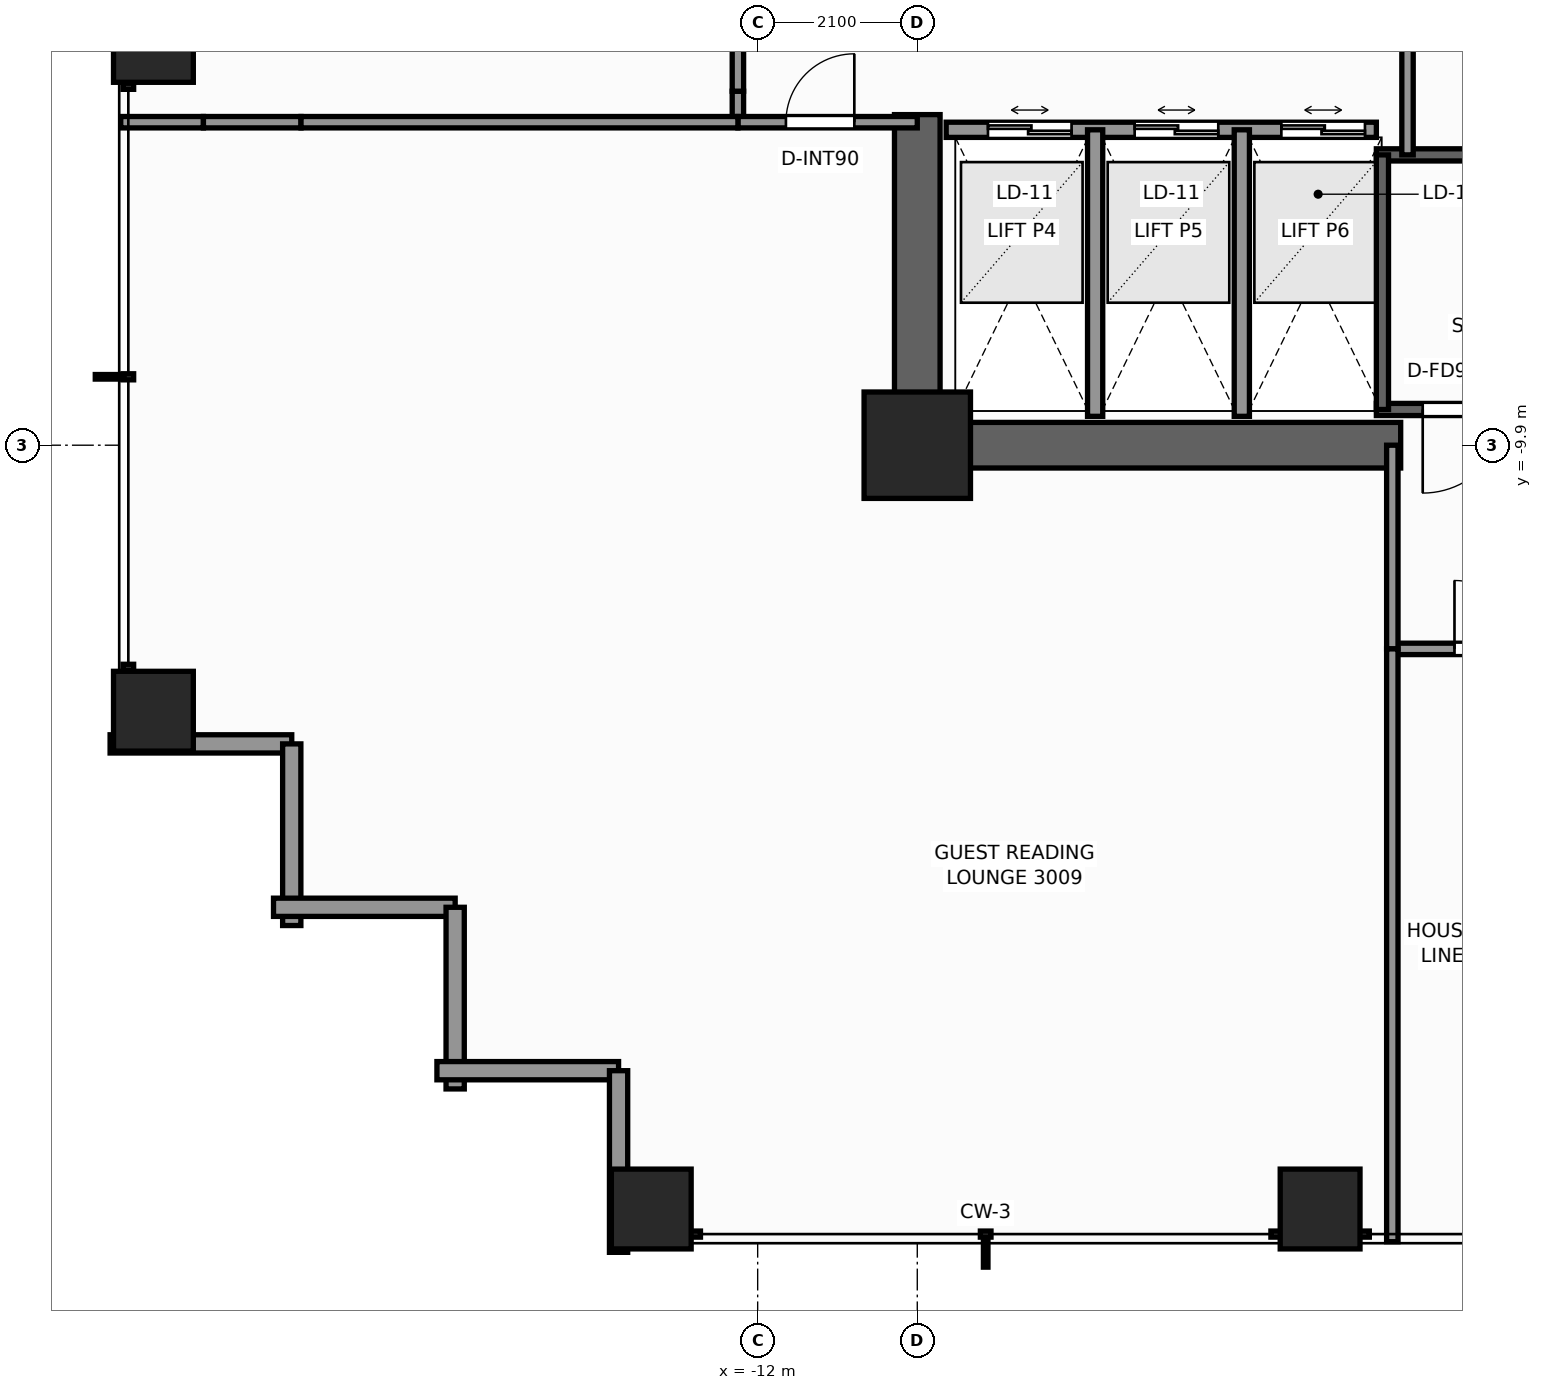
"""IFC4 building model, lengths in metres.
Left out: names, types, materials, properties, quantities, classifications, styles, units other than length and angle.
Written with IfcOpenShell. Run it as: python <this file> out.ifc"""

import sys

from ifc_helpers import new_model, si_unit, direction, frame, frame_2d, origin, origin_2d, place, context, subcontext, project, spatial, rectangle, extrude, element, fill, save


model = new_model("IFC4")
c1 = context("Model", 3, precision=1e-05, world=origin(), true_north=direction((0.0, 1.0)))
c2 = subcontext(c1, "Body", "Model", "MODEL_VIEW")
j1 = project(units=[si_unit("LENGTHUNIT", "METRE"), si_unit("PLANEANGLEUNIT", "RADIAN")], contexts=[c1])
p1 = place(None, origin())
s1 = spatial("IfcSite", under=j1, at=p1, CompositionType="ELEMENT")
p2 = place(p1, origin())
s2 = spatial("IfcBuilding", under=s1, at=p2, CompositionType="ELEMENT")
p3 = place(p2, frame((0.0, 0.0, 105.2)))
s3 = spatial("IfcBuildingStorey", under=s2, at=p3, CompositionType="ELEMENT", Elevation=105.2)
p4 = place(p3, frame((-3.54, -9.9, 0.0), z_axis=(0.0, 0.0, 1.0), x_axis=(-1.0, 0.0, 0.0)))
e1 = element("IfcWall", 1, at=p4, inside=s3, PredefinedType="SHEAR", context=c2, shape_type="SweptSolid", body=[
    extrude(rectangle(XDim=6.66, YDim=0.6, at=frame_2d((3.33, 0.0))), origin(), (0.0, 0.0, 1.0), 3.3),
])
p5 = place(p3, frame((-9.9, -9.6, 0.0), z_axis=(0.0, 0.0, 1.0), x_axis=(0.0, 1.0, 0.0)))
e2 = element("IfcWall", 2, at=p5, inside=s3, PredefinedType="SHEAR", context=c2, shape_type="SweptSolid", body=[
    extrude(rectangle(XDim=4.05, YDim=0.6, at=frame_2d((2.025, 0.0))), origin(), (0.0, 0.0, 1.0), 3.3),
])
p6 = place(p3, frame((-9.9, -9.9, 0.0), z_axis=(0.0, 0.0, 1.0), x_axis=(1.0, 0.0, 0.0)))
e3 = element("IfcColumn", 3, at=p6, inside=s3, PredefinedType="COLUMN", context=c2, shape_type="SweptSolid", body=[
    extrude(rectangle(XDim=1.4, YDim=1.4, at=origin_2d()), origin(), (0.0, 0.0, 1.0), 3.3),
])
for number, where, z_axis, x_axis in (
    (4, (-13.4, -19.95, 0.0), (0.0, 0.0, 1.0), (1.0, 0.0, 0.0)),
    (5, (-4.6, -19.95, 0.0), (0.0, 0.0, 1.0), (1.0, 0.0, 0.0)),
    (6, (-19.95, -13.4, 0.0), (0.0, 0.0, 1.0), (1.0, 0.0, 0.0)),
    (7, (-19.95, -4.6, 0.0), (0.0, 0.0, 1.0), (1.0, 0.0, 0.0)),
):
    element("IfcColumn", number, at=place(p3, frame(where, z_axis=z_axis, x_axis=x_axis)), inside=s3, PredefinedType="COLUMN", context=c2, shape_type="SweptSolid", body=[
        extrude(rectangle(XDim=1.05, YDim=1.05, at=origin_2d()), origin(), (0.0, 0.0, 1.0), 3.3),
    ])
p7 = place(p3, frame((-18.13, -13.83, 0.0), z_axis=(0.0, 0.0, 1.0), x_axis=(-1.0, 0.0, 0.0)))
e8 = element("IfcWall", 8, at=p7, inside=s3, PredefinedType="STANDARD", context=c2, shape_type="SweptSolid", body=[
    extrude(rectangle(XDim=2.39, YDim=0.24, at=frame_2d((1.195, 0.0))), origin(), (0.0, 0.0, 1.0), 1.275),
])
p8 = place(p3, frame((-18.13, -16.22, 0.0), z_axis=(0.0, 0.0, 1.0), x_axis=(0.0, 1.0, 0.0)))
e9 = element("IfcWall", 9, at=p8, inside=s3, PredefinedType="STANDARD", context=c2, shape_type="SweptSolid", body=[
    extrude(rectangle(XDim=2.39, YDim=0.24, at=frame_2d((1.195, 0.0))), origin(), (0.0, 0.0, 1.0), 1.275),
])
for number, where, z_axis, x_axis in (
    (10, (-15.98, -15.98, 0.0), (0.0, 0.0, 1.0), (-1.0, 0.0, 0.0)),
    (11, (-15.98, -18.37, 0.0), (0.0, 0.0, 1.0), (0.0, 1.0, 0.0)),
):
    element("IfcWall", number, at=place(p3, frame(where, z_axis=z_axis, x_axis=x_axis)), inside=s3, PredefinedType="STANDARD", context=c2, shape_type="SweptSolid", body=[
        extrude(rectangle(XDim=2.39, YDim=0.24, at=frame_2d((1.195, 0.0))), origin(), (0.0, 0.0, 1.0), 1.275),
    ])
p9 = place(p3, frame((-13.83, -18.13, 0.0), z_axis=(0.0, 0.0, 1.0), x_axis=(-1.0, 0.0, 0.0)))
e12 = element("IfcWall", 12, at=p9, inside=s3, PredefinedType="STANDARD", context=c2, shape_type="SweptSolid", body=[
    extrude(rectangle(XDim=2.39, YDim=0.24, at=frame_2d((1.195, 0.0))), origin(), (0.0, 0.0, 1.0), 1.275),
])
p10 = place(p3, frame((-13.83, -20.52, 0.0), z_axis=(0.0, 0.0, 1.0), x_axis=(0.0, 1.0, 0.0)))
e13 = element("IfcWall", 13, at=p10, inside=s3, PredefinedType="STANDARD", context=c2, shape_type="SweptSolid", body=[
    extrude(rectangle(XDim=2.39, YDim=0.24, at=frame_2d((1.195, 0.0))), origin(), (0.0, 0.0, 1.0), 1.275),
])
p11 = place(p3, frame((3.86, -9.43, 0.0), z_axis=(0.0, 0.0, 1.0), x_axis=(-1.0, 0.0, 0.0)))
e14 = element("IfcWall", 14, at=p11, inside=s3, PredefinedType="SHEAR", context=c2, shape_type="SweptSolid", body=[
    extrude(rectangle(XDim=7.72, YDim=0.16, at=frame_2d((3.86, 0.0))), origin(), (0.0, 0.0, 1.0), 3.3),
])
p12 = place(p11, frame((6.01, 0.0, 0.0)))
e15 = element("IfcOpeningElement", 15, at=p12, cuts=e14, PredefinedType="OPENING", context=c2, shape_type="SweptSolid", body=[
    extrude(rectangle(XDim=1.1, YDim=2.2, at=frame_2d((0.55, 1.1))), frame((0.0, 0.09, 0.0), z_axis=(0.0, -1.0, 0.0), x_axis=(1.0, 0.0, 0.0)), (0.0, 0.0, 1.0), 0.18),
])
p13 = place(p3, frame((-3.86, -6.08, 0.0), z_axis=(0.0, 0.0, 1.0), x_axis=(1.0, 0.0, 0.0)))
e16 = element("IfcWall", 16, at=p13, inside=s3, PredefinedType="SHEAR", context=c2, shape_type="SweptSolid", body=[
    extrude(rectangle(XDim=7.72, YDim=0.16, at=frame_2d((3.86, 0.0))), origin(), (0.0, 0.0, 1.0), 3.3),
])
p14 = place(p3, frame((-3.78, -9.43, 0.0), z_axis=(0.0, 0.0, 1.0), x_axis=(0.0, 1.0, 0.0)))
e17 = element("IfcWall", 17, at=p14, inside=s3, PredefinedType="SHEAR", context=c2, shape_type="SweptSolid", body=[
    extrude(rectangle(XDim=3.35, YDim=0.16, at=frame_2d((1.675, 0.0))), origin(), (0.0, 0.0, 1.0), 3.3),
])
p15 = place(p3, frame((-9.52, -5.75, 0.0), z_axis=(0.0, 0.0, 1.0), x_axis=(1.0, 0.0, 0.0)))
e18 = element("IfcWall", 18, at=p15, inside=s3, PredefinedType="SOLIDWALL", context=c2, shape_type="SweptSolid", body=[
    extrude(rectangle(XDim=5.66, YDim=0.2, at=frame_2d((2.83, 0.0))), origin(), (0.0, 0.0, 1.0), 3.08),
])
p16 = place(p15, frame((0.55, 0.0, 0.0)))
e19 = element("IfcOpeningElement", 19, at=p16, cuts=e18, PredefinedType="OPENING", context=c2, shape_type="SweptSolid", body=[
    extrude(rectangle(XDim=1.1, YDim=2.2, at=frame_2d((0.55, 1.1))), frame((0.0, 0.11, 0.0), z_axis=(0.0, -1.0, 0.0), x_axis=(1.0, 0.0, 0.0)), (0.0, 0.0, 1.0), 0.22),
])
p17 = place(p15, frame((2.48, 0.0, 0.0)))
e20 = element("IfcOpeningElement", 20, at=p17, cuts=e18, PredefinedType="OPENING", context=c2, shape_type="SweptSolid", body=[
    extrude(rectangle(XDim=1.1, YDim=2.2, at=frame_2d((0.55, 1.1))), frame((0.0, 0.11, 0.0), z_axis=(0.0, -1.0, 0.0), x_axis=(1.0, 0.0, 0.0)), (0.0, 0.0, 1.0), 0.22),
])
p18 = place(p15, frame((4.41, 0.0, 0.0)))
e21 = element("IfcOpeningElement", 21, at=p18, cuts=e18, PredefinedType="OPENING", context=c2, shape_type="SweptSolid", body=[
    extrude(rectangle(XDim=1.1, YDim=2.2, at=frame_2d((0.55, 1.1))), frame((0.0, 0.11, 0.0), z_axis=(0.0, -1.0, 0.0), x_axis=(1.0, 0.0, 0.0)), (0.0, 0.0, 1.0), 0.22),
])
for number, where, z_axis, x_axis in (
    (22, (-7.56, -9.52, 0.0), (0.0, 0.0, 1.0), (0.0, 1.0, 0.0)),
    (23, (-5.63, -9.52, 0.0), (0.0, 0.0, 1.0), (0.0, 1.0, 0.0)),
):
    element("IfcWall", number, at=place(p3, frame(where, z_axis=z_axis, x_axis=x_axis)), inside=s3, PredefinedType="SOLIDWALL", context=c2, shape_type="SweptSolid", body=[
        extrude(rectangle(XDim=3.77, YDim=0.2, at=frame_2d((1.885, 0.0))), origin(), (0.0, 0.0, 1.0), 3.08),
    ])
p19 = place(p3, frame((-3.45, -6.08, 0.0), z_axis=(0.0, 0.0, 1.0), x_axis=(0.0, 1.0, 0.0)))
e24 = element("IfcWall", 24, at=p19, inside=s3, PredefinedType="PARTITIONING", context=c2, shape_type="SweptSolid", body=[
    extrude(rectangle(XDim=2.36, YDim=0.15, at=frame_2d((1.18, 0.0))), origin(), (0.0, 0.0, 1.0), 3.08),
])
p20 = place(p3, frame((-3.65, -12.58, 0.0), z_axis=(0.0, 0.0, 1.0), x_axis=(1.0, 0.0, 0.0)))
e25 = element("IfcWall", 25, at=p20, inside=s3, PredefinedType="PARTITIONING", context=c2, shape_type="SweptSolid", body=[
    extrude(rectangle(XDim=7.608, YDim=0.15, at=frame_2d((3.804, 0.0))), origin(), (0.0, 0.0, 1.0), 2.605),
])
p21 = place(p20, frame((0.818, 0.0, 0.0)))
e26 = element("IfcOpeningElement", 26, at=p21, cuts=e25, PredefinedType="OPENING", context=c2, shape_type="SweptSolid", body=[
    extrude(rectangle(XDim=0.9, YDim=2.06, at=frame_2d((0.45, 1.03))), frame((0.0, 0.085, 0.0), z_axis=(0.0, -1.0, 0.0), x_axis=(1.0, 0.0, 0.0)), (0.0, 0.0, 1.0), 0.17),
])
p22 = place(p20, frame((4.522, 0.0, 0.0)))
e27 = element("IfcOpeningElement", 27, at=p22, cuts=e25, PredefinedType="OPENING", context=c2, shape_type="SweptSolid", body=[
    extrude(rectangle(XDim=0.95, YDim=2.06, at=frame_2d((0.475, 1.03))), frame((0.0, 0.085, 0.0), z_axis=(0.0, -1.0, 0.0), x_axis=(1.0, 0.0, 0.0)), (0.0, 0.0, 1.0), 0.17),
])
p23 = place(p3, frame((-3.65, -12.58, 0.0), z_axis=(0.0, 0.0, 1.0), x_axis=(0.0, 1.0, 0.0)))
e28 = element("IfcWall", 28, at=p23, inside=s3, PredefinedType="PARTITIONING", context=c2, shape_type="SweptSolid", body=[
    extrude(rectangle(XDim=2.68, YDim=0.15, at=frame_2d((1.34, 0.0))), origin(), (0.0, 0.0, 1.0), 3.08),
])
p24 = place(p3, frame((-12.26, -5.65, 0.0), z_axis=(0.0, 0.0, 1.0), x_axis=(0.0, 1.0, 0.0)))
e29 = element("IfcWall", 29, at=p24, inside=s3, PredefinedType="PARTITIONING", context=c2, shape_type="SweptSolid", body=[
    extrude(rectangle(XDim=0.408, YDim=0.15, at=frame_2d((0.204, 0.0))), origin(), (0.0, 0.0, 1.0), 3.08),
])
p25 = place(p3, frame((-12.26, -5.242, 0.0), z_axis=(0.0, 0.0, 1.0), x_axis=(0.0, 1.0, 0.0)))
e30 = element("IfcWall", 30, at=p25, inside=s3, PredefinedType="PARTITIONING", context=c2, shape_type="SweptSolid", body=[
    extrude(rectangle(XDim=1.284, YDim=0.15, at=frame_2d((0.642, 0.0))), origin(), (0.0, 0.0, 1.0), 1.265),
])
p26 = place(p3, frame((-12.26, -5.65, 0.0), z_axis=(0.0, 0.0, 1.0), x_axis=(1.0, 0.0, 0.0)))
e31 = element("IfcWall", 31, at=p26, inside=s3, PredefinedType="PARTITIONING", context=c2, shape_type="SweptSolid", body=[
    extrude(rectangle(XDim=2.36, YDim=0.15, at=frame_2d((1.18, 0.0))), origin(), (0.0, 0.0, 1.0), 3.08),
])
p27 = place(p26, frame((0.632, 0.0, 0.0)))
e32 = element("IfcOpeningElement", 32, at=p27, cuts=e31, PredefinedType="OPENING", context=c2, shape_type="SweptSolid", body=[
    extrude(rectangle(XDim=0.9, YDim=2.06, at=frame_2d((0.45, 1.03))), frame((0.0, 0.085, 0.0), z_axis=(0.0, -1.0, 0.0), x_axis=(1.0, 0.0, 0.0)), (0.0, 0.0, 1.0), 0.17),
])
p28 = place(p3, frame((-20.38, -5.65, 0.0), z_axis=(0.0, 0.0, 1.0), x_axis=(1.0, 0.0, 0.0)))
e33 = element("IfcWall", 33, at=p28, inside=s3, PredefinedType="PARTITIONING", context=c2, shape_type="SweptSolid", body=[
    extrude(rectangle(XDim=1.088, YDim=0.15, at=frame_2d((0.544, 0.0))), origin(), (0.0, 0.0, 1.0), 2.449),
])
p29 = place(p3, frame((-19.292, -5.65, 0.0), z_axis=(0.0, 0.0, 1.0), x_axis=(1.0, 0.0, 0.0)))
e34 = element("IfcWall", 34, at=p29, inside=s3, PredefinedType="PARTITIONING", context=c2, shape_type="SweptSolid", body=[
    extrude(rectangle(XDim=1.284, YDim=0.15, at=frame_2d((0.642, 0.0))), origin(), (0.0, 0.0, 1.0), 1.265),
])
p30 = place(p3, frame((-18.008, -5.65, 0.0), z_axis=(0.0, 0.0, 1.0), x_axis=(1.0, 0.0, 0.0)))
e35 = element("IfcWall", 35, at=p30, inside=s3, PredefinedType="PARTITIONING", context=c2, shape_type="SweptSolid", body=[
    extrude(rectangle(XDim=5.748, YDim=0.15, at=frame_2d((2.874, 0.0))), origin(), (0.0, 0.0, 1.0), 3.08),
])
p31 = place(p3, frame((-3.65, -20.38, 0.0), z_axis=(0.0, 0.0, 1.0), x_axis=(0.0, 1.0, 0.0)))
e36 = element("IfcWall", 36, at=p31, inside=s3, PredefinedType="PARTITIONING", context=c2, shape_type="SweptSolid", body=[
    extrude(rectangle(XDim=7.8, YDim=0.15, at=frame_2d((3.9, 0.0))), origin(), (0.0, 0.0, 1.0), 2.449),
])
p32 = place(p12, origin())
e37 = element("IfcDoor", 37, at=p32, inside=s3, OperationType="SINGLE_SWING_RIGHT", PredefinedType="DOOR", context=c2, shape_type="SweptSolid", body=[
    extrude(rectangle(XDim=1.1, YDim=2.2, at=frame_2d((0.55, 1.1))), frame((0.0, 0.025, 0.0), z_axis=(0.0, -1.0, 0.0), x_axis=(1.0, 0.0, 0.0)), (0.0, 0.0, 1.0), 0.05),
])
fill(e15, e37)
p33 = place(p16, origin())
e38 = element("IfcDoor", 38, at=p33, inside=s3, OperationType="DOUBLE_DOOR_SLIDING", PredefinedType="DOOR", context=c2, shape_type="SweptSolid", body=[
    extrude(rectangle(XDim=1.1, YDim=2.2, at=frame_2d((0.55, 1.1))), frame((0.0, 0.025, 0.0), z_axis=(0.0, -1.0, 0.0), x_axis=(1.0, 0.0, 0.0)), (0.0, 0.0, 1.0), 0.05),
])
fill(e19, e38)
p34 = place(p17, origin())
e39 = element("IfcDoor", 39, at=p34, inside=s3, OperationType="DOUBLE_DOOR_SLIDING", PredefinedType="DOOR", context=c2, shape_type="SweptSolid", body=[
    extrude(rectangle(XDim=1.1, YDim=2.2, at=frame_2d((0.55, 1.1))), frame((0.0, 0.025, 0.0), z_axis=(0.0, -1.0, 0.0), x_axis=(1.0, 0.0, 0.0)), (0.0, 0.0, 1.0), 0.05),
])
fill(e20, e39)
p35 = place(p18, origin())
e40 = element("IfcDoor", 40, at=p35, inside=s3, OperationType="DOUBLE_DOOR_SLIDING", PredefinedType="DOOR", context=c2, shape_type="SweptSolid", body=[
    extrude(rectangle(XDim=1.1, YDim=2.2, at=frame_2d((0.55, 1.1))), frame((0.0, 0.025, 0.0), z_axis=(0.0, -1.0, 0.0), x_axis=(1.0, 0.0, 0.0)), (0.0, 0.0, 1.0), 0.05),
])
fill(e21, e40)
p36 = place(p27, origin())
e41 = element("IfcDoor", 41, at=p36, inside=s3, OperationType="SINGLE_SWING_RIGHT", PredefinedType="DOOR", context=c2, shape_type="SweptSolid", body=[
    extrude(rectangle(XDim=0.9, YDim=2.06, at=frame_2d((0.45, 1.03))), frame((0.0, 0.025, 0.0), z_axis=(0.0, -1.0, 0.0), x_axis=(1.0, 0.0, 0.0)), (0.0, 0.0, 1.0), 0.05),
])
fill(e32, e41)
p37 = place(p21, origin())
e42 = element("IfcDoor", 42, at=p37, inside=s3, OperationType="SINGLE_SWING_LEFT", PredefinedType="DOOR", context=c2, shape_type="SweptSolid", body=[
    extrude(rectangle(XDim=0.9, YDim=2.06, at=frame_2d((0.45, 1.03))), frame((0.0, 0.025, 0.0), z_axis=(0.0, -1.0, 0.0), x_axis=(1.0, 0.0, 0.0)), (0.0, 0.0, 1.0), 0.05),
])
fill(e26, e42)
save(model, sys.argv[1])
